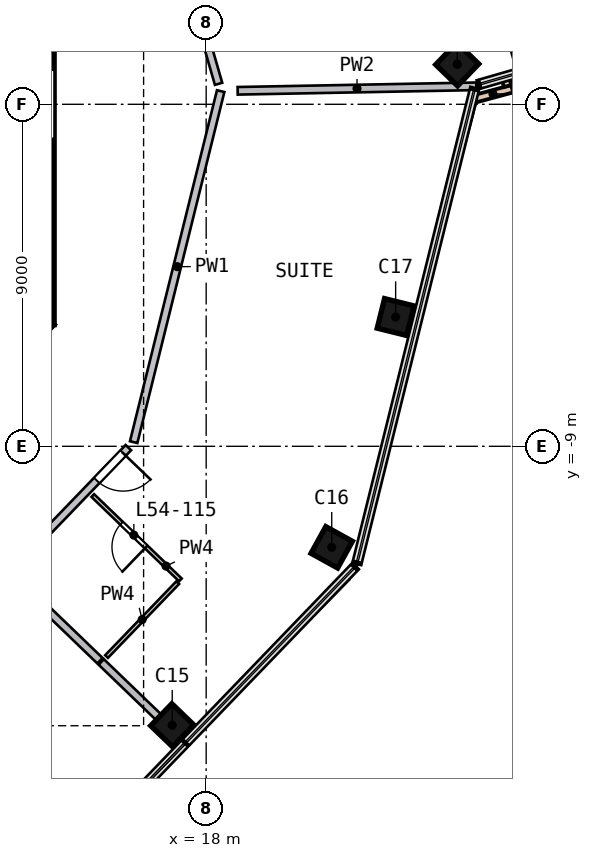
"""IFC4 building model, lengths in metres.
Left out: names, types, materials, properties, quantities, classifications, styles, units other than length and angle.
Written with IfcOpenShell. Run it as: python <this file> out.ifc"""

import sys

from ifc_helpers import new_model, si_unit, direction, frame, frame_2d, origin, origin_2d, place, context, subcontext, project, spatial, rectangle, extrude, element, fill, save


model = new_model("IFC4")
c1 = context("Model", 3, precision=1e-05, world=origin(), true_north=direction((0.0, 1.0)))
c2 = subcontext(c1, "Body", "Model", "MODEL_VIEW")
j1 = project(units=[si_unit("LENGTHUNIT", "METRE"), si_unit("PLANEANGLEUNIT", "RADIAN")], contexts=[c1])
p1 = place(None, origin())
s1 = spatial("IfcSite", under=j1, at=p1, CompositionType="ELEMENT")
p2 = place(p1, origin())
s2 = spatial("IfcBuilding", under=s1, at=p2, CompositionType="ELEMENT")
p3 = place(p2, frame((0.0, 0.0, 222.0)))
s3 = spatial("IfcBuildingStorey", under=s2, at=p3, CompositionType="ELEMENT", Elevation=222.0)
p4 = place(p3, frame((17.041, -16.411, 0.0), z_axis=(0.054384122, 0.05739393, 0.996869251), x_axis=(0.691739947, 0.717805399, -0.079064874)))
e1 = element("IfcColumn", 1, at=p4, inside=s3, PredefinedType="COLUMN", context=c2, shape_type="SweptSolid", body=[
    extrude(rectangle(XDim=0.8, YDim=0.8, at=origin_2d()), origin(), (0.0, 0.0, 1.0), 4.705),
])
p5 = place(p3, frame((21.257, -11.744, 0.0), z_axis=(0.038654009, 0.071341292, 0.996702708), x_axis=(-0.482188923, -0.872301895, 0.081137213)))
e2 = element("IfcColumn", 2, at=p5, inside=s3, PredefinedType="COLUMN", context=c2, shape_type="SweptSolid", body=[
    extrude(rectangle(XDim=0.8, YDim=0.8, at=origin_2d()), origin(), (0.0, 0.0, 1.0), 4.706),
])
p6 = place(p3, frame((22.963, -5.691, 0.0), z_axis=(0.018422156, 0.07685412, 0.996872142), x_axis=(0.240534622, 0.96741801, -0.079028416)))
e3 = element("IfcColumn", 3, at=p6, inside=s3, PredefinedType="COLUMN", context=c2, shape_type="SweptSolid", body=[
    extrude(rectangle(XDim=0.8, YDim=0.8, at=origin_2d()), origin(), (0.0, 0.0, 1.0), 4.705),
])
p7 = place(p3, frame((24.611, 0.954, 0.0), z_axis=(-0.003890982, 0.082177533, 0.996610111), x_axis=(-0.694843067, -0.716946059, 0.056404442)))
e4 = element("IfcColumn", 4, at=p7, inside=s3, PredefinedType="COLUMN", context=c2, shape_type="SweptSolid", body=[
    extrude(rectangle(XDim=0.8, YDim=0.8, at=origin_2d()), origin(), (0.0, 0.0, 1.0), 4.706),
])
p8 = place(p3, frame((13.75, -5.799, 0.0), z_axis=(0.0, 0.0, 1.0), x_axis=(0.0, 1.0, 0.0)))
e5 = element("IfcWall", 5, at=p8, inside=s3, PredefinedType="SHEAR", context=c2, shape_type="SweptSolid", body=[
    extrude(rectangle(XDim=11.598, YDim=0.5, at=frame_2d((5.799, 0.0))), origin(), (0.0, 0.0, 1.0), 5.0),
])
p9 = place(p8, frame((4.899, 0.0, 0.0)))
e6 = element("IfcOpeningElement", 6, at=p9, cuts=e5, PredefinedType="OPENING", context=c2, shape_type="SweptSolid", body=[
    extrude(rectangle(XDim=1.8, YDim=2.1, at=frame_2d((0.9, 1.05))), frame((0.0, 0.26, 0.0), z_axis=(0.0, -1.0, 0.0), x_axis=(1.0, 0.0, 0.0)), (0.0, 0.0, 1.0), 0.52),
])
p10 = place(p3, frame((5.622, -13.823, 0.0), z_axis=(0.0, 0.0, 1.0), x_axis=(0.707106781, 0.707106781, 0.0)))
e7 = element("IfcWall", 7, at=p10, inside=s3, PredefinedType="SHEAR", context=c2, shape_type="SweptSolid", body=[
    extrude(rectangle(XDim=11.598, YDim=0.5, at=frame_2d((5.799, 0.0))), origin(), (0.0, 0.0, 1.0), 5.0),
])
p11 = place(p10, frame((2.099, 0.0, 0.0)))
e8 = element("IfcOpeningElement", 8, at=p11, cuts=e7, PredefinedType="OPENING", context=c2, shape_type="SweptSolid", body=[
    extrude(rectangle(XDim=1.2, YDim=2.1, at=frame_2d((0.6, 1.05))), frame((0.0, 0.26, 0.0), z_axis=(0.0, -1.0, 0.0), x_axis=(1.0, 0.0, 0.0)), (0.0, 0.0, 1.0), 0.52),
])
p12 = place(p3, frame((26.285, 0.812, 0.0), z_axis=(0.0, 0.0, 1.0), x_axis=(-0.276973388, 0.96087759, 0.0)))
e9 = element("IfcWall", 9, at=p12, inside=s3, PredefinedType="SOLIDWALL", context=c2, shape_type="SweptSolid", body=[
    extrude(rectangle(XDim=1.875, YDim=0.15, at=frame_2d((0.938, 0.0))), origin(), (0.0, 0.0, 1.0), 4.69),
])
p13 = place(p3, frame((25.04, 0.136, 0.0), z_axis=(0.0, 0.0, 1.0), x_axis=(0.965399806, 0.260774261, 0.0)))
e10 = element("IfcWall", 10, at=p13, inside=s3, PredefinedType="PARAPET", context=c2, shape_type="SweptSolid", body=[
    extrude(rectangle(XDim=1.05, YDim=0.2, at=frame_2d((0.525, 0.0))), origin(), (0.0, 0.0, 1.0), 1.1),
])
p14 = place(p3, frame((25.931, 0.48, 0.0), z_axis=(0.0, 0.0, 1.0), x_axis=(-0.261329138, 0.965249751, 0.0)))
e11 = element("IfcWall", 11, at=p14, inside=s3, PredefinedType="PARAPET", context=c2, shape_type="SweptSolid", body=[
    extrude(rectangle(XDim=0.219, YDim=0.2, at=frame_2d((0.11, 0.0))), origin(), (0.0, 0.0, 1.0), 1.1),
])
p15 = place(p3, frame((15.953, -9.035, 0.0), z_axis=(0.0, 0.0, 1.0), x_axis=(-0.693656613, -0.72030584, 0.0)))
e12 = element("IfcWall", 12, at=p15, inside=s3, PredefinedType="SOLIDWALL", context=c2, shape_type="SweptSolid", body=[
    extrude(rectangle(XDim=9.115, YDim=0.2, at=frame_2d((4.558, 0.0))), origin(), (0.0, 0.0, 1.0), 4.69),
])
p16 = place(p15, frame((0.2, 0.0, 0.0)))
e13 = element("IfcOpeningElement", 13, at=p16, cuts=e12, PredefinedType="OPENING", context=c2, shape_type="SweptSolid", body=[
    extrude(rectangle(XDim=1.0, YDim=2.1, at=frame_2d((0.5, 1.05))), frame((0.0, 0.11, 0.0), z_axis=(0.0, -1.0, 0.0), x_axis=(1.0, 0.0, 0.0)), (0.0, 0.0, 1.0), 0.22),
])
p17 = place(p3, frame((15.746, 9.491, 0.0), z_axis=(0.0, 0.0, 1.0), x_axis=(0.276983861, -0.960874571, 0.0)))
e14 = element("IfcWall", 14, at=p17, inside=s3, PredefinedType="SOLIDWALL", context=c2, shape_type="SweptSolid", body=[
    extrude(rectangle(XDim=9.317, YDim=0.2, at=frame_2d((4.658, 0.0))), origin(), (0.0, 0.0, 1.0), 4.69),
])
p18 = place(p17, frame((3.861, 0.0, 0.0)))
e15 = element("IfcOpeningElement", 15, at=p18, cuts=e14, PredefinedType="OPENING", context=c2, shape_type="SweptSolid", body=[
    extrude(rectangle(XDim=1.8, YDim=2.1, at=frame_2d((0.9, 1.05))), frame((0.0, 0.11, 0.0), z_axis=(0.0, -1.0, 0.0), x_axis=(1.0, 0.0, 0.0)), (0.0, 0.0, 1.0), 0.22),
])
p19 = place(p3, frame((16.092, -8.89, 0.0), z_axis=(0.0, 0.0, 1.0), x_axis=(0.240573225, 0.970630992, 0.0)))
e16 = element("IfcWall", 16, at=p19, inside=s3, PredefinedType="SOLIDWALL", context=c2, shape_type="SweptSolid", body=[
    extrude(rectangle(XDim=9.516, YDim=0.2, at=frame_2d((4.758, 0.0))), origin(), (0.0, 0.0, 1.0), 4.69),
])
p20 = place(p3, frame((13.114, -12.628, 0.0), z_axis=(0.0, 0.0, 1.0), x_axis=(0.720303104, -0.693659454, 0.0)))
e17 = element("IfcWall", 17, at=p20, inside=s3, PredefinedType="SOLIDWALL", context=c2, shape_type="SweptSolid", body=[
    extrude(rectangle(XDim=2.905, YDim=0.2, at=frame_2d((1.452, 0.0))), origin(), (0.0, 0.0, 1.0), 4.69),
])
p21 = place(p3, frame((15.239, -14.675, 0.0), z_axis=(0.0, 0.0, 1.0), x_axis=(0.72032167, -0.693640175, 0.0)))
e18 = element("IfcWall", 18, at=p21, inside=s3, PredefinedType="SOLIDWALL", context=c2, shape_type="SweptSolid", body=[
    extrude(rectangle(XDim=3.102, YDim=0.2, at=frame_2d((1.551, 0.0))), origin(), (0.0, 0.0, 1.0), 4.69),
])
p22 = place(p3, frame((25.11, 0.473, 0.0), z_axis=(0.0, 0.0, 1.0), x_axis=(-0.999822352, -0.018848441, 0.0)))
e19 = element("IfcWall", 19, at=p22, inside=s3, PredefinedType="SOLIDWALL", context=c2, shape_type="SweptSolid", body=[
    extrude(rectangle(XDim=6.282, YDim=0.2, at=frame_2d((3.141, 0.0))), origin(), (0.0, 0.0, 1.0), 4.69),
])
p23 = place(p3, frame((17.322, -12.516, 0.0), z_axis=(0.0, 0.0, 1.0), x_axis=(-0.7202948, 0.693668077, 0.0)))
e20 = element("IfcWall", 20, at=p23, inside=s3, PredefinedType="PARTITIONING", context=c2, shape_type="SweptSolid", body=[
    extrude(rectangle(XDim=3.2, YDim=0.1, at=frame_2d((1.6, 0.0))), origin(), (0.0, 0.0, 1.0), 4.69),
])
p24 = place(p23, frame((1.25, 0.0, 0.0)))
e21 = element("IfcOpeningElement", 21, at=p24, cuts=e20, PredefinedType="OPENING", context=c2, shape_type="SweptSolid", body=[
    extrude(rectangle(XDim=0.9, YDim=2.1, at=frame_2d((0.45, 1.05))), frame((0.0, 0.06, 0.0), z_axis=(0.0, -1.0, 0.0), x_axis=(1.0, 0.0, 0.0)), (0.0, 0.0, 1.0), 0.12),
])
p25 = place(p3, frame((17.252, -12.588, 0.0), z_axis=(0.0, 0.0, 1.0), x_axis=(-0.693643425, -0.72031854, 0.0)))
e22 = element("IfcWall", 22, at=p25, inside=s3, PredefinedType="PARTITIONING", context=c2, shape_type="SweptSolid", body=[
    extrude(rectangle(XDim=2.7, YDim=0.1, at=frame_2d((1.35, 0.0))), origin(), (0.0, 0.0, 1.0), 4.69),
])
p26 = place(p16, origin())
e23 = element("IfcDoor", 23, at=p26, inside=s3, OperationType="SINGLE_SWING_LEFT", PredefinedType="DOOR", context=c2, shape_type="SweptSolid", body=[
    extrude(rectangle(XDim=1.0, YDim=2.1, at=frame_2d((0.5, 1.05))), frame((0.0, 0.025, 0.0), z_axis=(0.0, -1.0, 0.0), x_axis=(1.0, 0.0, 0.0)), (0.0, 0.0, 1.0), 0.05),
])
fill(e13, e23)
p27 = place(p24, origin())
e24 = element("IfcDoor", 24, at=p27, inside=s3, OperationType="SINGLE_SWING_LEFT", PredefinedType="DOOR", context=c2, shape_type="SweptSolid", body=[
    extrude(rectangle(XDim=0.9, YDim=2.1, at=frame_2d((0.45, 1.05))), frame((0.0, 0.025, 0.0), z_axis=(0.0, -1.0, 0.0), x_axis=(1.0, 0.0, 0.0)), (0.0, 0.0, 1.0), 0.05),
])
fill(e21, e24)
save(model, sys.argv[1])
